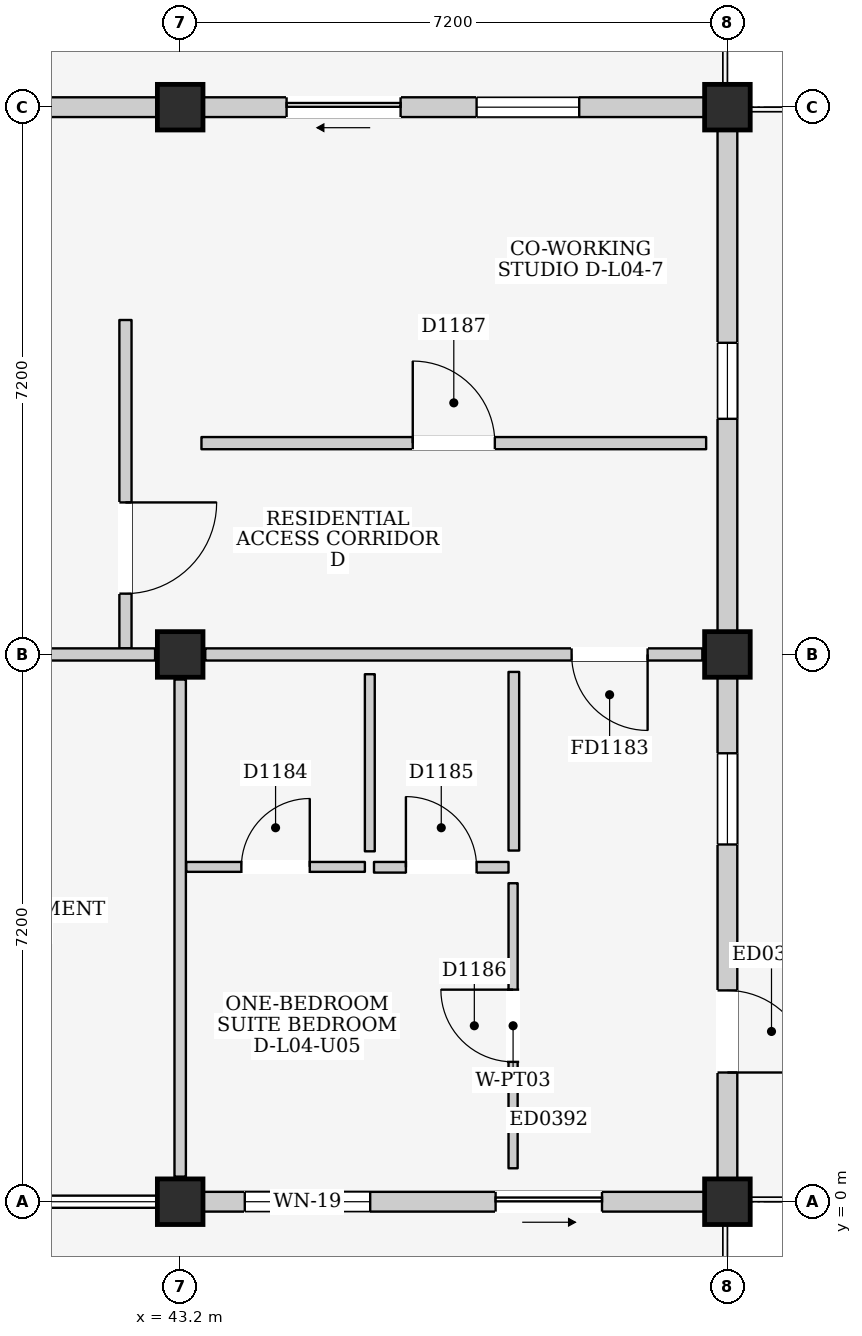
"""IFC4 building model, lengths in metres.
Left out: names, types, materials, properties, quantities, classifications, styles, units other than length and angle.
Written with IfcOpenShell. Run it as: python <this file> out.ifc"""

import sys

from ifc_helpers import new_model, si_unit, direction, frame, frame_2d, origin, origin_2d, place, context, subcontext, project, spatial, rectangle, extrude, element, fill, save


model = new_model("IFC4")
c1 = context("Model", 3, precision=1e-05, world=origin(), true_north=direction((0.0, 1.0)))
c2 = subcontext(c1, "Body", "Model", "MODEL_VIEW")
j1 = project(units=[si_unit("LENGTHUNIT", "METRE"), si_unit("PLANEANGLEUNIT", "RADIAN")], contexts=[c1])
p1 = place(None, origin())
s1 = spatial("IfcSite", under=j1, at=p1, CompositionType="ELEMENT")
p2 = place(p1, origin())
s2 = spatial("IfcBuilding", under=s1, at=p2, CompositionType="ELEMENT")
p3 = place(p2, frame((0.0, 0.0, 15.4)))
s3 = spatial("IfcBuildingStorey", under=s2, at=p3, CompositionType="ELEMENT", Elevation=15.4)
for number, where, z_axis, x_axis in (
    (1, (43.2, 0.0, 0.0), (0.0, 0.0, 1.0), (1.0, 0.0, 0.0)),
    (2, (43.2, 7.2, 0.0), (0.0, 0.0, 1.0), (1.0, 0.0, 0.0)),
    (3, (43.2, 14.4, 0.0), (0.0, 0.0, 1.0), (1.0, 0.0, 0.0)),
    (4, (50.4, 0.0, 0.0), (0.0, 0.0, 1.0), (1.0, 0.0, 0.0)),
    (5, (50.4, 7.2, 0.0), (0.0, 0.0, 1.0), (1.0, 0.0, 0.0)),
    (6, (50.4, 14.4, 0.0), (0.0, 0.0, 1.0), (1.0, 0.0, 0.0)),
):
    element("IfcColumn", number, at=place(p3, frame(where, z_axis=z_axis, x_axis=x_axis)), inside=s3, PredefinedType="COLUMN", context=c2, shape_type="SweptSolid", body=[
        extrude(rectangle(XDim=0.6, YDim=0.6, at=origin_2d()), origin(), (0.0, 0.0, 1.0), 3.2),
    ])
p4 = place(p3, frame((36.3, 14.4, 0.0), z_axis=(0.0, 0.0, 1.0), x_axis=(1.0, 0.0, 0.0)))
e7 = element("IfcWall", 7, at=p4, inside=s3, PredefinedType="ELEMENTEDWALL", context=c2, shape_type="SweptSolid", body=[
    extrude(rectangle(XDim=6.6, YDim=0.26, at=frame_2d((3.3, 0.0))), origin(), (0.0, 0.0, 1.0), 2.335),
])
p5 = place(p4, frame((2.8, 0.0, 1.2)))
e8 = element("IfcOpeningElement", 8, at=p5, cuts=e7, PredefinedType="OPENING", context=c2, shape_type="SweptSolid", body=[
    extrude(rectangle(XDim=1.0, YDim=0.9, at=frame_2d((0.5, 0.45))), frame((0.0, 0.145, 0.0), z_axis=(0.0, -1.0, 0.0), x_axis=(1.0, 0.0, 0.0)), (0.0, 0.0, 1.0), 0.29),
])
p6 = place(p3, frame((43.5, 0.0, 0.0), z_axis=(0.0, 0.0, 1.0), x_axis=(1.0, 0.0, 0.0)))
e9 = element("IfcWall", 9, at=p6, inside=s3, PredefinedType="ELEMENTEDWALL", context=c2, shape_type="SweptSolid", body=[
    extrude(rectangle(XDim=6.6, YDim=0.26, at=frame_2d((3.3, 0.0))), origin(), (0.0, 0.0, 1.0), 2.43),
])
p7 = place(p6, frame((3.85, 0.0, 0.0)))
e10 = element("IfcOpeningElement", 10, at=p7, cuts=e9, PredefinedType="OPENING", context=c2, shape_type="SweptSolid", body=[
    extrude(rectangle(XDim=1.4, YDim=2.1, at=frame_2d((0.7, 1.05))), frame((0.0, 0.145, 0.0), z_axis=(0.0, -1.0, 0.0), x_axis=(1.0, 0.0, 0.0)), (0.0, 0.0, 1.0), 0.29),
])
p8 = place(p6, frame((0.55, 0.0, 0.9)))
e11 = element("IfcOpeningElement", 11, at=p8, cuts=e9, PredefinedType="OPENING", context=c2, shape_type="SweptSolid", body=[
    extrude(rectangle(XDim=1.65, YDim=1.35, at=frame_2d((0.825, 0.675))), frame((0.0, 0.145, 0.0), z_axis=(0.0, -1.0, 0.0), x_axis=(1.0, 0.0, 0.0)), (0.0, 0.0, 1.0), 0.29),
])
p9 = place(p3, frame((50.4, 0.3, 0.0), z_axis=(0.0, 0.0, 1.0), x_axis=(0.0, 1.0, 0.0)))
e12 = element("IfcWall", 12, at=p9, inside=s3, PredefinedType="ELEMENTEDWALL", context=c2, shape_type="SweptSolid", body=[
    extrude(rectangle(XDim=6.6, YDim=0.26, at=frame_2d((3.3, 0.0))), origin(), (0.0, 0.0, 1.0), 2.385),
])
p10 = place(p9, frame((1.4, 0.0, 0.0)))
e13 = element("IfcOpeningElement", 13, at=p10, cuts=e12, PredefinedType="OPENING", context=c2, shape_type="SweptSolid", body=[
    extrude(rectangle(XDim=1.08, YDim=2.12, at=frame_2d((0.54, 1.06))), frame((0.0, 0.145, 0.0), z_axis=(0.0, -1.0, 0.0), x_axis=(1.0, 0.0, 0.0)), (0.0, 0.0, 1.0), 0.29),
])
p11 = place(p9, frame((4.4, 0.0, 0.925)))
e14 = element("IfcOpeningElement", 14, at=p11, cuts=e12, PredefinedType="OPENING", context=c2, shape_type="SweptSolid", body=[
    extrude(rectangle(XDim=1.2, YDim=1.35, at=frame_2d((0.6, 0.675))), frame((0.0, 0.145, 0.0), z_axis=(0.0, -1.0, 0.0), x_axis=(1.0, 0.0, 0.0)), (0.0, 0.0, 1.0), 0.29),
])
p12 = place(p3, frame((43.5, 14.4, 0.0), z_axis=(0.0, 0.0, 1.0), x_axis=(1.0, 0.0, 0.0)))
e15 = element("IfcWall", 15, at=p12, inside=s3, PredefinedType="ELEMENTEDWALL", context=c2, shape_type="SweptSolid", body=[
    extrude(rectangle(XDim=6.6, YDim=0.26, at=frame_2d((3.3, 0.0))), origin(), (0.0, 0.0, 1.0), 2.335),
])
p13 = place(p12, frame((1.1, 0.0, 0.0)))
e16 = element("IfcOpeningElement", 16, at=p13, cuts=e15, PredefinedType="OPENING", context=c2, shape_type="SweptSolid", body=[
    extrude(rectangle(XDim=1.5, YDim=2.12, at=frame_2d((0.75, 1.06))), frame((0.0, 0.145, 0.0), z_axis=(0.0, -1.0, 0.0), x_axis=(1.0, 0.0, 0.0)), (0.0, 0.0, 1.0), 0.29),
])
p14 = place(p12, frame((3.6, 0.0, 0.725)))
e17 = element("IfcOpeningElement", 17, at=p14, cuts=e15, PredefinedType="OPENING", context=c2, shape_type="SweptSolid", body=[
    extrude(rectangle(XDim=1.35, YDim=1.5, at=frame_2d((0.675, 0.75))), frame((0.0, 0.145, 0.0), z_axis=(0.0, -1.0, 0.0), x_axis=(1.0, 0.0, 0.0)), (0.0, 0.0, 1.0), 0.29),
])
p15 = place(p3, frame((50.4, 7.5, 0.0), z_axis=(0.0, 0.0, 1.0), x_axis=(0.0, 1.0, 0.0)))
e18 = element("IfcWall", 18, at=p15, inside=s3, PredefinedType="ELEMENTEDWALL", context=c2, shape_type="SweptSolid", body=[
    extrude(rectangle(XDim=6.6, YDim=0.26, at=frame_2d((3.3, 0.0))), origin(), (0.0, 0.0, 1.0), 2.385),
])
p16 = place(p15, frame((2.8, 0.0, 1.1)))
e19 = element("IfcOpeningElement", 19, at=p16, cuts=e18, PredefinedType="OPENING", context=c2, shape_type="SweptSolid", body=[
    extrude(rectangle(XDim=1.0, YDim=0.9, at=frame_2d((0.5, 0.45))), frame((0.0, 0.145, 0.0), z_axis=(0.0, -1.0, 0.0), x_axis=(1.0, 0.0, 0.0)), (0.0, 0.0, 1.0), 0.29),
])
p17 = place(p3, frame((42.48, 7.28, 0.0), z_axis=(0.0, 0.0, 1.0), x_axis=(0.0, 1.0, 0.0)))
e20 = element("IfcWall", 20, at=p17, inside=s3, PredefinedType="PARTITIONING", context=c2, shape_type="SweptSolid", body=[
    extrude(rectangle(XDim=4.32, YDim=0.16, at=frame_2d((2.16, 0.0))), origin(), (0.0, 0.0, 1.0), 2.95),
])
p18 = place(p17, frame((0.72, 0.0, 0.0)))
e21 = element("IfcOpeningElement", 21, at=p18, cuts=e20, PredefinedType="OPENING", context=c2, shape_type="SweptSolid", body=[
    extrude(rectangle(XDim=1.2, YDim=2.2, at=frame_2d((0.6, 1.1))), frame((0.0, 0.095, 0.0), z_axis=(0.0, -1.0, 0.0), x_axis=(1.0, 0.0, 0.0)), (0.0, 0.0, 1.0), 0.19),
])
p19 = place(p3, frame((36.33, 7.2, 0.0), z_axis=(0.0, 0.0, 1.0), x_axis=(1.0, 0.0, 0.0)))
e22 = element("IfcWall", 22, at=p19, inside=s3, PredefinedType="PARTITIONING", context=c2, shape_type="SweptSolid", body=[
    extrude(rectangle(XDim=6.54, YDim=0.16, at=frame_2d((3.27, 0.0))), origin(), (0.0, 0.0, 1.0), 2.335),
])
p20 = place(p19, frame((4.12, 0.0, 0.0)))
e23 = element("IfcOpeningElement", 23, at=p20, cuts=e22, PredefinedType="OPENING", context=c2, shape_type="SweptSolid", body=[
    extrude(rectangle(XDim=1.0, YDim=2.15, at=frame_2d((0.5, 1.075))), frame((0.0, 0.095, 0.0), z_axis=(0.0, -1.0, 0.0), x_axis=(1.0, 0.0, 0.0)), (0.0, 0.0, 1.0), 0.19),
])
p21 = place(p3, frame((43.2, 0.33, 0.0), z_axis=(0.0, 0.0, 1.0), x_axis=(0.0, 1.0, 0.0)))
e24 = element("IfcWall", 24, at=p21, inside=s3, PredefinedType="PARTITIONING", context=c2, shape_type="SweptSolid", body=[
    extrude(rectangle(XDim=6.54, YDim=0.15, at=frame_2d((3.27, 0.0))), origin(), (0.0, 0.0, 1.0), 2.385),
])
p22 = place(p3, frame((43.53, 7.2, 0.0), z_axis=(0.0, 0.0, 1.0), x_axis=(1.0, 0.0, 0.0)))
e25 = element("IfcWall", 25, at=p22, inside=s3, PredefinedType="PARTITIONING", context=c2, shape_type="SweptSolid", body=[
    extrude(rectangle(XDim=6.54, YDim=0.16, at=frame_2d((3.27, 0.0))), origin(), (0.0, 0.0, 1.0), 2.335),
])
p23 = place(p22, frame((4.82, 0.0, 0.0)))
e26 = element("IfcOpeningElement", 26, at=p23, cuts=e25, PredefinedType="OPENING", context=c2, shape_type="SweptSolid", body=[
    extrude(rectangle(XDim=1.0, YDim=2.15, at=frame_2d((0.5, 1.075))), frame((0.0, 0.095, 0.0), z_axis=(0.0, -1.0, 0.0), x_axis=(1.0, 0.0, 0.0)), (0.0, 0.0, 1.0), 0.19),
])
p24 = place(p3, frame((43.28, 4.405, 0.0), z_axis=(0.0, 0.0, 1.0), x_axis=(1.0, 0.0, 0.0)))
e27 = element("IfcWall", 27, at=p24, inside=s3, PredefinedType="PARTITIONING", context=c2, shape_type="SweptSolid", body=[
    extrude(rectangle(XDim=2.35, YDim=0.13, at=frame_2d((1.175, 0.0))), origin(), (0.0, 0.0, 1.0), 2.95),
])
p25 = place(p24, frame((0.725, 0.0, 0.0)))
e28 = element("IfcOpeningElement", 28, at=p25, cuts=e27, PredefinedType="OPENING", context=c2, shape_type="SweptSolid", body=[
    extrude(rectangle(XDim=0.9, YDim=2.1, at=frame_2d((0.45, 1.05))), frame((0.0, 0.08, 0.0), z_axis=(0.0, -1.0, 0.0), x_axis=(1.0, 0.0, 0.0)), (0.0, 0.0, 1.0), 0.16),
])
p26 = place(p3, frame((45.695, 4.61, 0.0), z_axis=(0.0, 0.0, 1.0), x_axis=(0.0, 1.0, 0.0)))
e29 = element("IfcWall", 29, at=p26, inside=s3, PredefinedType="PARTITIONING", context=c2, shape_type="SweptSolid", body=[
    extrude(rectangle(XDim=2.33, YDim=0.13, at=frame_2d((1.165, 0.0))), origin(), (0.0, 0.0, 1.0), 2.95),
])
p27 = place(p3, frame((45.75, 4.4, 0.0), z_axis=(0.0, 0.0, 1.0), x_axis=(1.0, 0.0, 0.0)))
e30 = element("IfcWall", 30, at=p27, inside=s3, PredefinedType="PARTITIONING", context=c2, shape_type="SweptSolid", body=[
    extrude(rectangle(XDim=1.77, YDim=0.14, at=frame_2d((0.885, 0.0))), origin(), (0.0, 0.0, 1.0), 2.95),
])
p28 = place(p27, frame((0.42, 0.0, 0.0)))
e31 = element("IfcOpeningElement", 31, at=p28, cuts=e30, PredefinedType="OPENING", context=c2, shape_type="SweptSolid", body=[
    extrude(rectangle(XDim=0.93, YDim=2.14, at=frame_2d((0.465, 1.07))), frame((0.0, 0.085, 0.0), z_axis=(0.0, -1.0, 0.0), x_axis=(1.0, 0.0, 0.0)), (0.0, 0.0, 1.0), 0.17),
])
p29 = place(p3, frame((47.59, 4.62, 0.0), z_axis=(0.0, 0.0, 1.0), x_axis=(0.0, 1.0, 0.0)))
e32 = element("IfcWall", 32, at=p29, inside=s3, PredefinedType="PARTITIONING", context=c2, shape_type="SweptSolid", body=[
    extrude(rectangle(XDim=2.35, YDim=0.14, at=frame_2d((1.175, 0.0))), origin(), (0.0, 0.0, 1.0), 2.95),
])
p30 = place(p3, frame((47.58, 0.44, 0.0), z_axis=(0.0, 0.0, 1.0), x_axis=(0.0, 1.0, 0.0)))
e33 = element("IfcWall", 33, at=p30, inside=s3, PredefinedType="PARTITIONING", context=c2, shape_type="SweptSolid", body=[
    extrude(rectangle(XDim=3.75, YDim=0.12, at=frame_2d((1.875, 0.0))), origin(), (0.0, 0.0, 1.0), 2.95),
])
p31 = place(p30, frame((1.4, 0.0, 0.0)))
e34 = element("IfcOpeningElement", 34, at=p31, cuts=e33, PredefinedType="OPENING", context=c2, shape_type="SweptSolid", body=[
    extrude(rectangle(XDim=0.95, YDim=2.15, at=frame_2d((0.475, 1.075))), frame((0.0, 0.075, 0.0), z_axis=(0.0, -1.0, 0.0), x_axis=(1.0, 0.0, 0.0)), (0.0, 0.0, 1.0), 0.15),
])
p32 = place(p3, frame((43.48, 9.98, 0.0), z_axis=(0.0, 0.0, 1.0), x_axis=(1.0, 0.0, 0.0)))
e35 = element("IfcWall", 35, at=p32, inside=s3, PredefinedType="PARTITIONING", context=c2, shape_type="SweptSolid", body=[
    extrude(rectangle(XDim=6.64, YDim=0.16, at=frame_2d((3.32, 0.0))), origin(), (0.0, 0.0, 1.0), 2.95),
])
p33 = place(p32, frame((2.78, 0.0, 0.0)))
e36 = element("IfcOpeningElement", 36, at=p33, cuts=e35, PredefinedType="OPENING", context=c2, shape_type="SweptSolid", body=[
    extrude(rectangle(XDim=1.08, YDim=2.22, at=frame_2d((0.54, 1.11))), frame((0.0, 0.095, 0.0), z_axis=(0.0, -1.0, 0.0), x_axis=(1.0, 0.0, 0.0)), (0.0, 0.0, 1.0), 0.19),
])
p34 = place(p7, frame((1.4, 0.0, 0.0), z_axis=(0.0, 0.0, 1.0), x_axis=(-1.0, 0.0, 0.0)))
e37 = element("IfcDoor", 37, at=p34, inside=s3, OperationType="SLIDING_TO_RIGHT", PredefinedType="DOOR", context=c2, shape_type="SweptSolid", body=[
    extrude(rectangle(XDim=1.4, YDim=2.1, at=frame_2d((0.7, 1.05))), frame((0.0, 0.025, 0.0), z_axis=(0.0, -1.0, 0.0), x_axis=(1.0, 0.0, 0.0)), (0.0, 0.0, 1.0), 0.05),
])
fill(e10, e37)
p35 = place(p8, origin())
e38 = element("IfcWindow", 38, at=p35, inside=s3, PartitioningType="DOUBLE_PANEL_VERTICAL", PredefinedType="WINDOW", context=c2, shape_type="SweptSolid", body=[
    extrude(rectangle(XDim=1.65, YDim=1.35, at=frame_2d((0.825, 0.675))), frame((0.0, 0.03, 0.0), z_axis=(0.0, -1.0, 0.0), x_axis=(1.0, 0.0, 0.0)), (0.0, 0.0, 1.0), 0.06),
])
fill(e11, e38)
p36 = place(p10, frame((1.08, 0.0, 0.0), z_axis=(0.0, 0.0, 1.0), x_axis=(-1.0, 0.0, 0.0)))
e39 = element("IfcDoor", 39, at=p36, inside=s3, OperationType="SINGLE_SWING_RIGHT", PredefinedType="DOOR", context=c2, shape_type="SweptSolid", body=[
    extrude(rectangle(XDim=1.08, YDim=2.12, at=frame_2d((0.54, 1.06))), frame((0.0, 0.025, 0.0), z_axis=(0.0, -1.0, 0.0), x_axis=(1.0, 0.0, 0.0)), (0.0, 0.0, 1.0), 0.05),
])
fill(e13, e39)
p37 = place(p11, origin())
e40 = element("IfcWindow", 40, at=p37, inside=s3, PartitioningType="SINGLE_PANEL", PredefinedType="WINDOW", context=c2, shape_type="SweptSolid", body=[
    extrude(rectangle(XDim=1.2, YDim=1.35, at=frame_2d((0.6, 0.675))), frame((0.0, 0.03, 0.0), z_axis=(0.0, -1.0, 0.0), x_axis=(1.0, 0.0, 0.0)), (0.0, 0.0, 1.0), 0.06),
])
fill(e14, e40)
p38 = place(p13, frame((1.5, 0.0, 0.0), z_axis=(0.0, 0.0, 1.0), x_axis=(-1.0, 0.0, 0.0)))
e41 = element("IfcDoor", 41, at=p38, inside=s3, OperationType="SLIDING_TO_LEFT", PredefinedType="DOOR", context=c2, shape_type="SweptSolid", body=[
    extrude(rectangle(XDim=1.5, YDim=2.12, at=frame_2d((0.75, 1.06))), frame((0.0, 0.025, 0.0), z_axis=(0.0, -1.0, 0.0), x_axis=(1.0, 0.0, 0.0)), (0.0, 0.0, 1.0), 0.05),
])
fill(e16, e41)
p39 = place(p14, origin())
e42 = element("IfcWindow", 42, at=p39, inside=s3, PartitioningType="SINGLE_PANEL", PredefinedType="WINDOW", context=c2, shape_type="SweptSolid", body=[
    extrude(rectangle(XDim=1.35, YDim=1.5, at=frame_2d((0.675, 0.75))), frame((0.0, 0.03, 0.0), z_axis=(0.0, -1.0, 0.0), x_axis=(1.0, 0.0, 0.0)), (0.0, 0.0, 1.0), 0.06),
])
fill(e17, e42)
p40 = place(p16, origin())
e43 = element("IfcWindow", 43, at=p40, inside=s3, PartitioningType="SINGLE_PANEL", PredefinedType="WINDOW", context=c2, shape_type="SweptSolid", body=[
    extrude(rectangle(XDim=1.0, YDim=0.9, at=frame_2d((0.5, 0.45))), frame((0.0, 0.03, 0.0), z_axis=(0.0, -1.0, 0.0), x_axis=(1.0, 0.0, 0.0)), (0.0, 0.0, 1.0), 0.06),
])
fill(e19, e43)
p41 = place(p18, frame((1.2, 0.0, 0.0), z_axis=(0.0, 0.0, 1.0), x_axis=(-1.0, 0.0, 0.0)))
e44 = element("IfcDoor", 44, at=p41, inside=s3, OperationType="SINGLE_SWING_LEFT", PredefinedType="DOOR", context=c2, shape_type="SweptSolid", body=[
    extrude(rectangle(XDim=1.2, YDim=2.2, at=frame_2d((0.6, 1.1))), frame((0.0, 0.025, 0.0), z_axis=(0.0, -1.0, 0.0), x_axis=(1.0, 0.0, 0.0)), (0.0, 0.0, 1.0), 0.05),
])
fill(e21, e44)
p42 = place(p23, frame((1.0, 0.0, 0.0), z_axis=(0.0, 0.0, 1.0), x_axis=(-1.0, 0.0, 0.0)))
e45 = element("IfcDoor", 45, at=p42, inside=s3, OperationType="SINGLE_SWING_LEFT", PredefinedType="DOOR", context=c2, shape_type="SweptSolid", body=[
    extrude(rectangle(XDim=1.0, YDim=2.15, at=frame_2d((0.5, 1.075))), frame((0.0, 0.025, 0.0), z_axis=(0.0, -1.0, 0.0), x_axis=(1.0, 0.0, 0.0)), (0.0, 0.0, 1.0), 0.05),
])
fill(e26, e45)
p43 = place(p25, origin())
e46 = element("IfcDoor", 46, at=p43, inside=s3, OperationType="SINGLE_SWING_RIGHT", PredefinedType="DOOR", context=c2, shape_type="SweptSolid", body=[
    extrude(rectangle(XDim=0.9, YDim=2.1, at=frame_2d((0.45, 1.05))), frame((0.0, 0.025, 0.0), z_axis=(0.0, -1.0, 0.0), x_axis=(1.0, 0.0, 0.0)), (0.0, 0.0, 1.0), 0.05),
])
fill(e28, e46)
p44 = place(p28, origin())
e47 = element("IfcDoor", 47, at=p44, inside=s3, OperationType="SINGLE_SWING_LEFT", PredefinedType="DOOR", context=c2, shape_type="SweptSolid", body=[
    extrude(rectangle(XDim=0.93, YDim=2.14, at=frame_2d((0.465, 1.07))), frame((0.0, 0.025, 0.0), z_axis=(0.0, -1.0, 0.0), x_axis=(1.0, 0.0, 0.0)), (0.0, 0.0, 1.0), 0.05),
])
fill(e31, e47)
p45 = place(p31, origin())
e48 = element("IfcDoor", 48, at=p45, inside=s3, OperationType="SINGLE_SWING_RIGHT", PredefinedType="DOOR", context=c2, shape_type="SweptSolid", body=[
    extrude(rectangle(XDim=0.95, YDim=2.15, at=frame_2d((0.475, 1.075))), frame((0.0, 0.025, 0.0), z_axis=(0.0, -1.0, 0.0), x_axis=(1.0, 0.0, 0.0)), (0.0, 0.0, 1.0), 0.05),
])
fill(e34, e48)
p46 = place(p33, origin())
e49 = element("IfcDoor", 49, at=p46, inside=s3, OperationType="SINGLE_SWING_LEFT", PredefinedType="DOOR", context=c2, shape_type="SweptSolid", body=[
    extrude(rectangle(XDim=1.08, YDim=2.22, at=frame_2d((0.54, 1.11))), frame((0.0, 0.025, 0.0), z_axis=(0.0, -1.0, 0.0), x_axis=(1.0, 0.0, 0.0)), (0.0, 0.0, 1.0), 0.05),
])
fill(e36, e49)
save(model, sys.argv[1])
